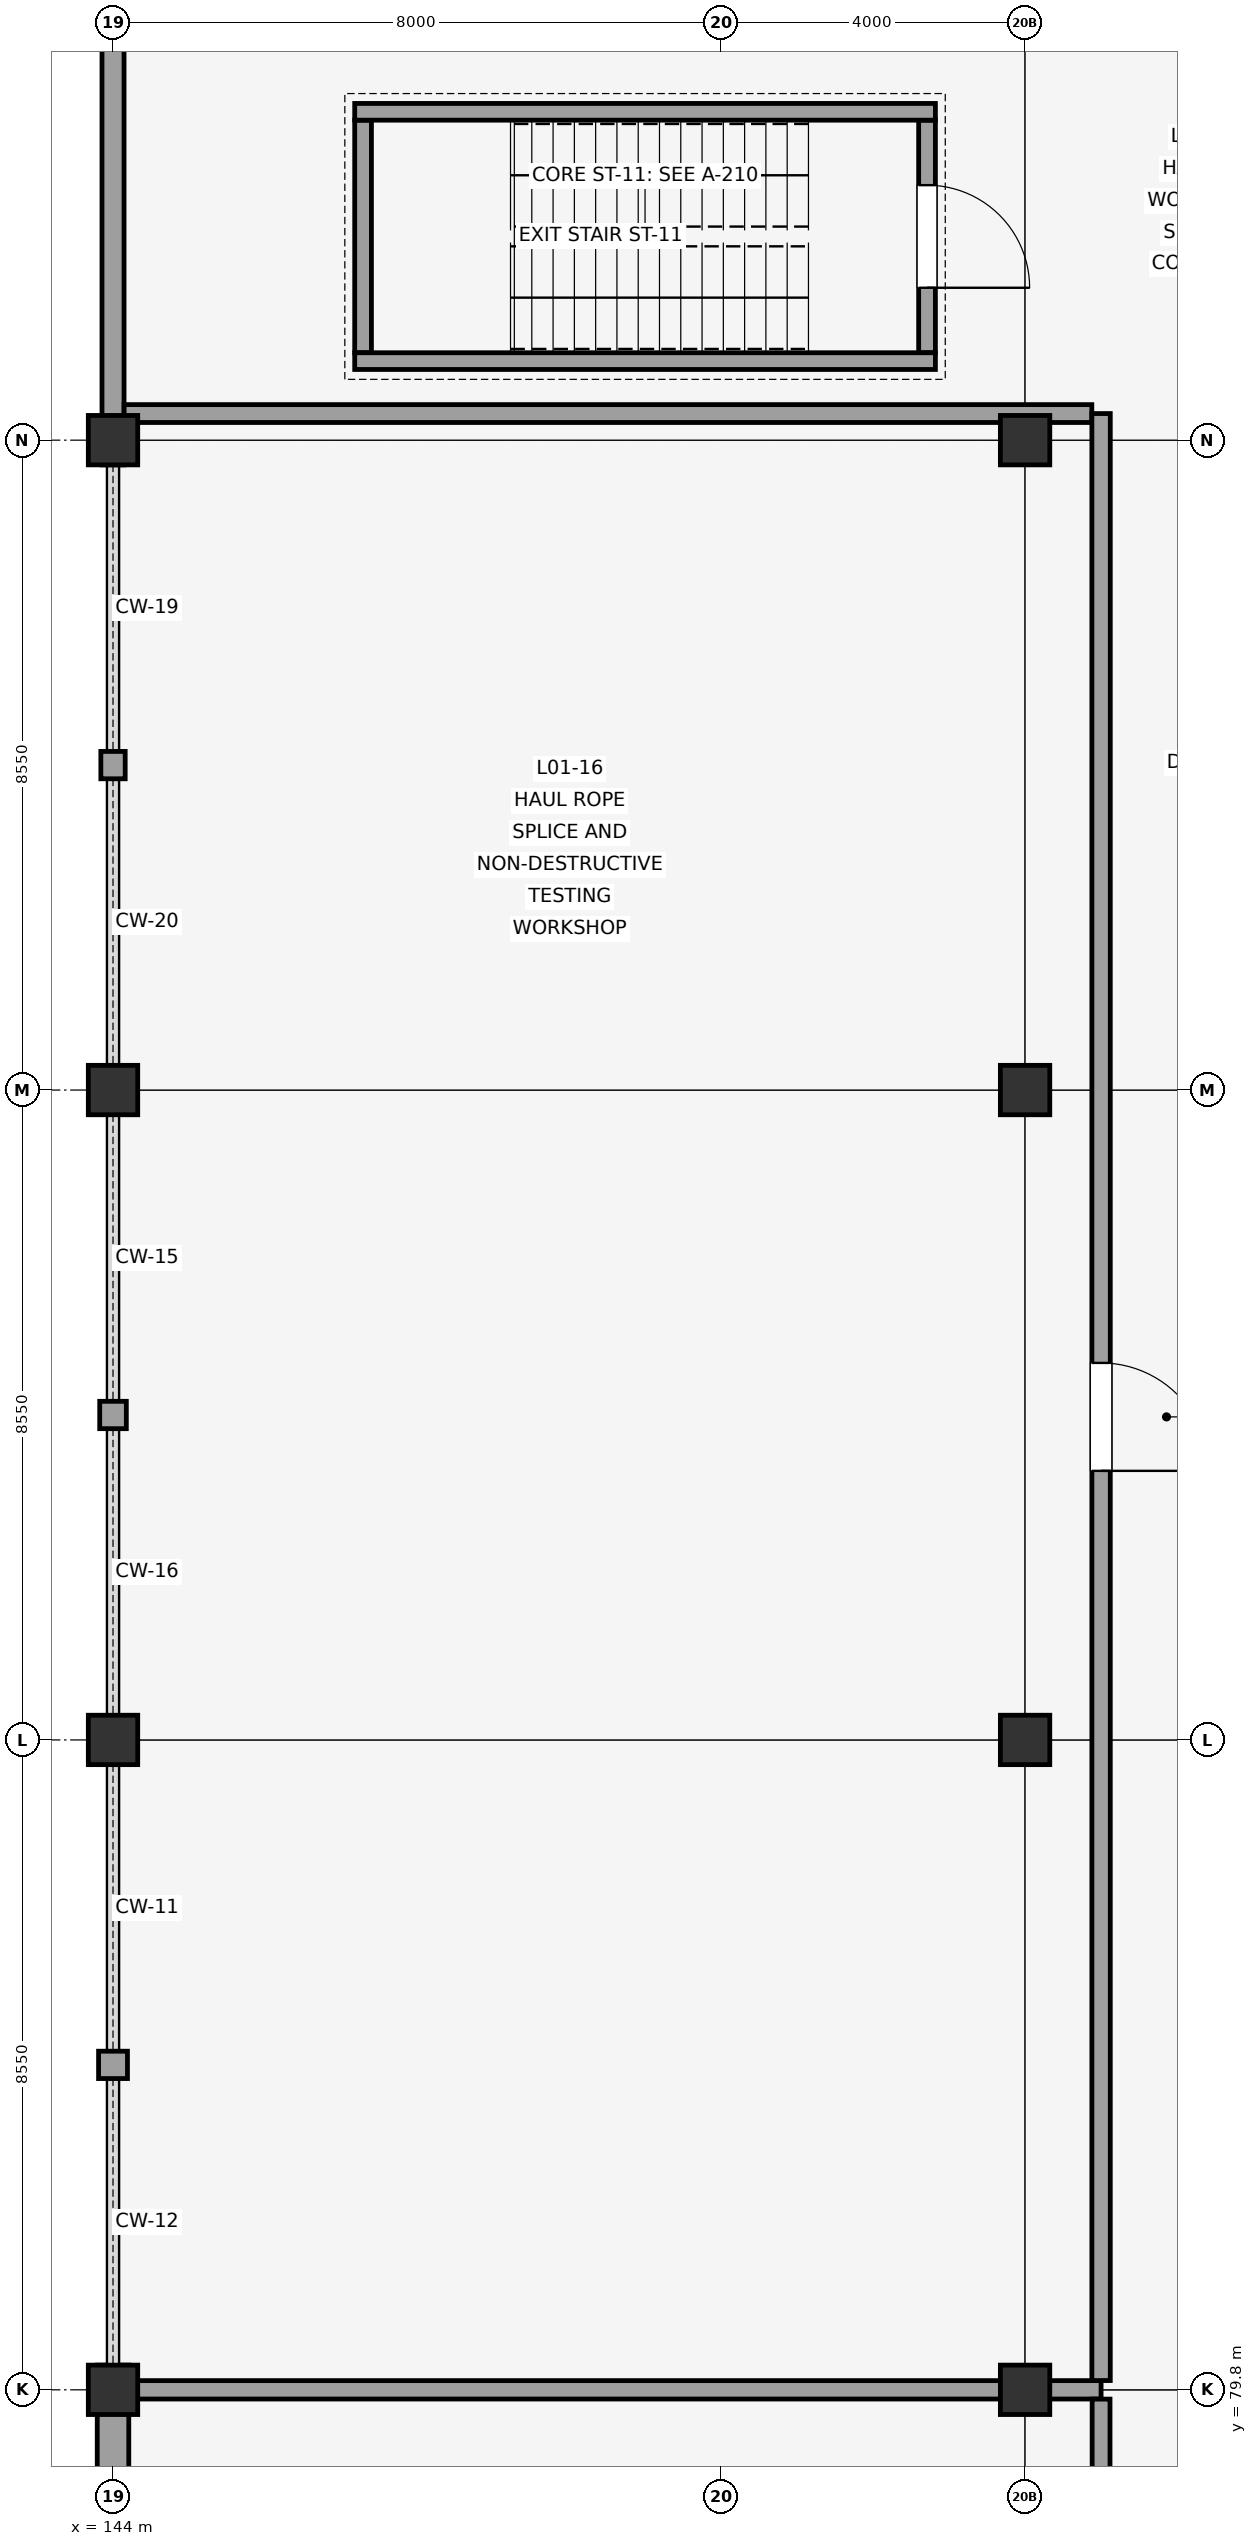
"""IFC4 building model, lengths in metres.
Left out: names, types, materials, properties, quantities, classifications, styles, units other than length and angle.
Written with IfcOpenShell. Run it as: python <this file> out.ifc"""

import sys

from ifc_helpers import new_model, si_unit, direction, frame, frame_2d, origin, origin_2d, place, context, subcontext, project, spatial, rectangle, extrude, element, fill, save


model = new_model("IFC4")
c1 = context("Model", 3, precision=1e-05, world=origin(), true_north=direction((0.0, 1.0)))
c2 = subcontext(c1, "Body", "Model", "MODEL_VIEW")
j1 = project(units=[si_unit("LENGTHUNIT", "METRE"), si_unit("PLANEANGLEUNIT", "RADIAN")], contexts=[c1])
p1 = place(None, origin())
s1 = spatial("IfcSite", under=j1, at=p1, CompositionType="ELEMENT")
p2 = place(p1, origin())
s2 = spatial("IfcBuilding", under=s1, at=p2, CompositionType="ELEMENT")
p3 = place(p2, frame((0.0, 0.0, 4.5)))
s3 = spatial("IfcBuildingStorey", under=s2, at=p3, CompositionType="ELEMENT", Elevation=4.5)
for number, where, z_axis, x_axis in (
    (1, (144.0, 79.8, 0.0), (0.0, 0.0, 1.0), (1.0, 0.0, 0.0)),
    (2, (144.0, 88.35, 0.0), (0.0, 0.0, 1.0), (1.0, 0.0, 0.0)),
    (3, (144.0, 96.9, 0.0), (0.0, 0.0, 1.0), (1.0, 0.0, 0.0)),
    (4, (144.0, 105.45, 0.0), (0.0, 0.0, 1.0), (1.0, 0.0, 0.0)),
    (5, (156.0, 79.8, 0.0), (0.0, 0.0, 1.0), (1.0, 0.0, 0.0)),
    (6, (156.0, 88.35, 0.0), (0.0, 0.0, 1.0), (1.0, 0.0, 0.0)),
    (7, (156.0, 96.9, 0.0), (0.0, 0.0, 1.0), (1.0, 0.0, 0.0)),
    (8, (156.0, 105.45, 0.0), (0.0, 0.0, 1.0), (1.0, 0.0, 0.0)),
):
    element("IfcColumn", number, at=place(p3, frame(where, z_axis=z_axis, x_axis=x_axis)), inside=s3, PredefinedType="COLUMN", context=c2, shape_type="SweptSolid", body=[
        extrude(rectangle(XDim=0.65, YDim=0.65, at=origin_2d()), origin(), (0.0, 0.0, 1.0), 4.5),
    ])
p4 = place(p3, frame((144.0, 80.125, 0.0), z_axis=(0.0, 0.0, 1.0), x_axis=(0.0, -1.0, 0.0)))
e9 = element("IfcWall", 9, at=p4, inside=s3, PredefinedType="SOLIDWALL", context=c2, shape_type="SweptSolid", body=[
    extrude(rectangle(XDim=9.2, YDim=0.415, at=frame_2d((4.6, 0.0))), origin(), (0.0, 0.0, 1.0), 3.12),
])
p5 = place(p4, frame((2.292, 0.0, 0.85)))
e10 = element("IfcOpeningElement", 10, at=p5, cuts=e9, PredefinedType="OPENING", context=c2, shape_type="SweptSolid", body=[
    extrude(rectangle(XDim=1.55, YDim=1.35, at=frame_2d((0.775, 0.675))), frame((0.0, 0.218, 0.0), z_axis=(0.0, -1.0, 0.0), x_axis=(1.0, 0.0, 0.0)), (0.0, 0.0, 1.0), 0.435),
])
p6 = place(p4, frame((5.358, 0.0, 0.85)))
e11 = element("IfcOpeningElement", 11, at=p6, cuts=e9, PredefinedType="OPENING", context=c2, shape_type="SweptSolid", body=[
    extrude(rectangle(XDim=1.55, YDim=1.35, at=frame_2d((0.775, 0.675))), frame((0.0, 0.218, 0.0), z_axis=(0.0, -1.0, 0.0), x_axis=(1.0, 0.0, 0.0)), (0.0, 0.0, 1.0), 0.435),
])
p7 = place(p3, frame((144.0, 84.255, 0.0), z_axis=(0.0, 0.0, 1.0), x_axis=(0.0, -1.0, 0.0)))
e12 = element("IfcWall", 12, at=p7, inside=s3, PredefinedType="SOLIDWALL", context=c2, shape_type="SweptSolid", body=[
    extrude(rectangle(XDim=0.36, YDim=0.38, at=frame_2d((0.18, 0.0))), origin(), (0.0, 0.0, 1.0), 3.12),
])
p8 = place(p3, frame((144.0, 92.805, 0.0), z_axis=(0.0, 0.0, 1.0), x_axis=(0.0, -1.0, 0.0)))
e13 = element("IfcWall", 13, at=p8, inside=s3, PredefinedType="SOLIDWALL", context=c2, shape_type="SweptSolid", body=[
    extrude(rectangle(XDim=0.36, YDim=0.35, at=frame_2d((0.18, 0.0))), origin(), (0.0, 0.0, 1.0), 3.12),
])
p9 = place(p3, frame((144.0, 101.355, 0.0), z_axis=(0.0, 0.0, 1.0), x_axis=(0.0, -1.0, 0.0)))
e14 = element("IfcWall", 14, at=p9, inside=s3, PredefinedType="SOLIDWALL", context=c2, shape_type="SweptSolid", body=[
    extrude(rectangle(XDim=0.36, YDim=0.32, at=frame_2d((0.18, 0.0))), origin(), (0.0, 0.0, 1.0), 3.12),
])
p10 = place(p3, frame((144.0, 113.816, 0.0), z_axis=(0.0, 0.0, 1.0), x_axis=(0.0, -1.0, 0.0)))
e15 = element("IfcWall", 15, at=p10, inside=s3, PredefinedType="SOLIDWALL", context=c2, shape_type="SweptSolid", body=[
    extrude(rectangle(XDim=8.691, YDim=0.29, at=frame_2d((4.346, 0.0))), origin(), (0.0, 0.0, 1.0), 3.12),
])
p11 = place(p3, frame((154.71, 109.66, 0.0), z_axis=(0.0, 0.0, 1.0), x_axis=(0.0, -1.0, 0.0)))
e16 = element("IfcWall", 16, at=p11, inside=s3, PredefinedType="SHEAR", context=c2, shape_type="SweptSolid", body=[
    extrude(rectangle(XDim=3.06, YDim=0.22, at=frame_2d((1.53, 0.0))), origin(), (0.0, 0.0, 1.0), 4.5),
])
p12 = place(p11, frame((0.855, 0.0, 0.0)))
e17 = element("IfcOpeningElement", 17, at=p12, cuts=e16, PredefinedType="OPENING", context=c2, shape_type="SweptSolid", body=[
    extrude(rectangle(XDim=1.35, YDim=2.15, at=frame_2d((0.675, 1.075))), frame((0.0, 0.12, 0.0), z_axis=(0.0, -1.0, 0.0), x_axis=(1.0, 0.0, 0.0)), (0.0, 0.0, 1.0), 0.24),
])
p13 = place(p3, frame((147.29, 109.66, 0.0), z_axis=(0.0, 0.0, 1.0), x_axis=(0.0, -1.0, 0.0)))
e18 = element("IfcWall", 18, at=p13, inside=s3, PredefinedType="SHEAR", context=c2, shape_type="SweptSolid", body=[
    extrude(rectangle(XDim=3.06, YDim=0.22, at=frame_2d((1.53, 0.0))), origin(), (0.0, 0.0, 1.0), 4.5),
])
for number, where, z_axis, x_axis in (
    (19, (154.82, 109.77, 0.0), (0.0, 0.0, 1.0), (-1.0, 0.0, 0.0)),
    (20, (154.82, 106.49, 0.0), (0.0, 0.0, 1.0), (-1.0, 0.0, 0.0)),
):
    element("IfcWall", number, at=place(p3, frame(where, z_axis=z_axis, x_axis=x_axis)), inside=s3, PredefinedType="SHEAR", context=c2, shape_type="SweptSolid", body=[
        extrude(rectangle(XDim=7.64, YDim=0.22, at=frame_2d((3.82, 0.0))), origin(), (0.0, 0.0, 1.0), 4.5),
    ])
p14 = place(p3, frame((144.208, 79.8, 0.0), z_axis=(0.0, 0.0, 1.0), x_axis=(1.0, 0.0, 0.0)))
e21 = element("IfcWall", 21, at=p14, inside=s3, PredefinedType="SOLIDWALL", context=c2, shape_type="SweptSolid", body=[
    extrude(rectangle(XDim=12.792, YDim=0.242, at=frame_2d((6.396, 0.0))), origin(), (0.0, 0.0, 1.0), 2.7),
])
p15 = place(p3, frame((157.0, 79.678, 0.0), z_axis=(0.0, 0.0, 1.0), x_axis=(0.0, -1.0, 0.0)))
e22 = element("IfcWall", 22, at=p15, inside=s3, PredefinedType="PARTITIONING", context=c2, shape_type="SweptSolid", body=[
    extrude(rectangle(XDim=28.756, YDim=0.235, at=frame_2d((14.378, 0.0))), origin(), (0.0, 0.0, 1.0), 2.7),
])
p16 = place(p15, frame((12.018, 0.0, 0.0)))
e23 = element("IfcOpeningElement", 23, at=p16, cuts=e22, PredefinedType="OPENING", context=c2, shape_type="SweptSolid", body=[
    extrude(rectangle(XDim=1.32, YDim=2.2, at=frame_2d((0.66, 1.1))), frame((0.0, 0.127, 0.0), z_axis=(0.0, -1.0, 0.0), x_axis=(1.0, 0.0, 0.0)), (0.0, 0.0, 1.0), 0.255),
])
p17 = place(p3, frame((144.2, 88.047, 0.0), z_axis=(0.0, 0.0, 1.0), x_axis=(0.0, 1.0, 0.0)))
e24 = element("IfcWall", 24, at=p17, inside=s3, PredefinedType="PARTITIONING", context=c2, shape_type="SweptSolid", body=[
    extrude(rectangle(XDim=0.606, YDim=0.235, at=frame_2d((0.303, 0.0))), origin(), (0.0, 0.0, 1.0), 2.7),
])
p18 = place(p3, frame((144.2, 96.597, 0.0), z_axis=(0.0, 0.0, 1.0), x_axis=(0.0, 1.0, 0.0)))
e25 = element("IfcWall", 25, at=p18, inside=s3, PredefinedType="SOLIDWALL", context=c2, shape_type="SweptSolid", body=[
    extrude(rectangle(XDim=0.606, YDim=0.242, at=frame_2d((0.303, 0.0))), origin(), (0.0, 0.0, 1.0), 2.7),
])
p19 = place(p3, frame((144.146, 105.8, 0.0), z_axis=(0.0, 0.0, 1.0), x_axis=(1.0, 0.0, 0.0)))
e26 = element("IfcWall", 26, at=p19, inside=s3, PredefinedType="PARTITIONING", context=c2, shape_type="SweptSolid", body=[
    extrude(rectangle(XDim=12.732, YDim=0.235, at=frame_2d((6.366, 0.0))), origin(), (0.0, 0.0, 1.0), 2.7),
])
p20 = place(p3, frame((157.0, 105.8, 0.0), z_axis=(0.0, 0.0, 1.0), x_axis=(0.0, -1.0, 0.0)))
e27 = element("IfcWall", 27, at=p20, inside=s3, PredefinedType="SOLIDWALL", context=c2, shape_type="SweptSolid", body=[
    extrude(rectangle(XDim=25.878, YDim=0.242, at=frame_2d((12.939, 0.0))), origin(), (0.0, 0.0, 1.0), 2.7),
])
p21 = place(p20, frame((12.49, 0.0, 0.0)))
e28 = element("IfcOpeningElement", 28, at=p21, cuts=e27, PredefinedType="OPENING", context=c2, shape_type="SweptSolid", body=[
    extrude(rectangle(XDim=1.42, YDim=2.2, at=frame_2d((0.71, 1.1))), frame((0.0, 0.131, 0.0), z_axis=(0.0, -1.0, 0.0), x_axis=(1.0, 0.0, 0.0)), (0.0, 0.0, 1.0), 0.262),
])
p22 = place(p12, origin())
e29 = element("IfcDoor", 29, at=p22, inside=s3, OperationType="SINGLE_SWING_RIGHT", PredefinedType="DOOR", context=c2, shape_type="SweptSolid", body=[
    extrude(rectangle(XDim=1.35, YDim=2.15, at=frame_2d((0.675, 1.075))), frame((0.0, 0.025, 0.0), z_axis=(0.0, -1.0, 0.0), x_axis=(1.0, 0.0, 0.0)), (0.0, 0.0, 1.0), 0.05),
])
fill(e17, e29)
p23 = place(p21, origin())
e30 = element("IfcDoor", 30, at=p23, inside=s3, OperationType="SINGLE_SWING_RIGHT", PredefinedType="DOOR", context=c2, shape_type="SweptSolid", body=[
    extrude(rectangle(XDim=1.42, YDim=2.2, at=frame_2d((0.71, 1.1))), frame((0.0, 0.025, 0.0), z_axis=(0.0, -1.0, 0.0), x_axis=(1.0, 0.0, 0.0)), (0.0, 0.0, 1.0), 0.05),
])
fill(e28, e30)
save(model, sys.argv[1])
